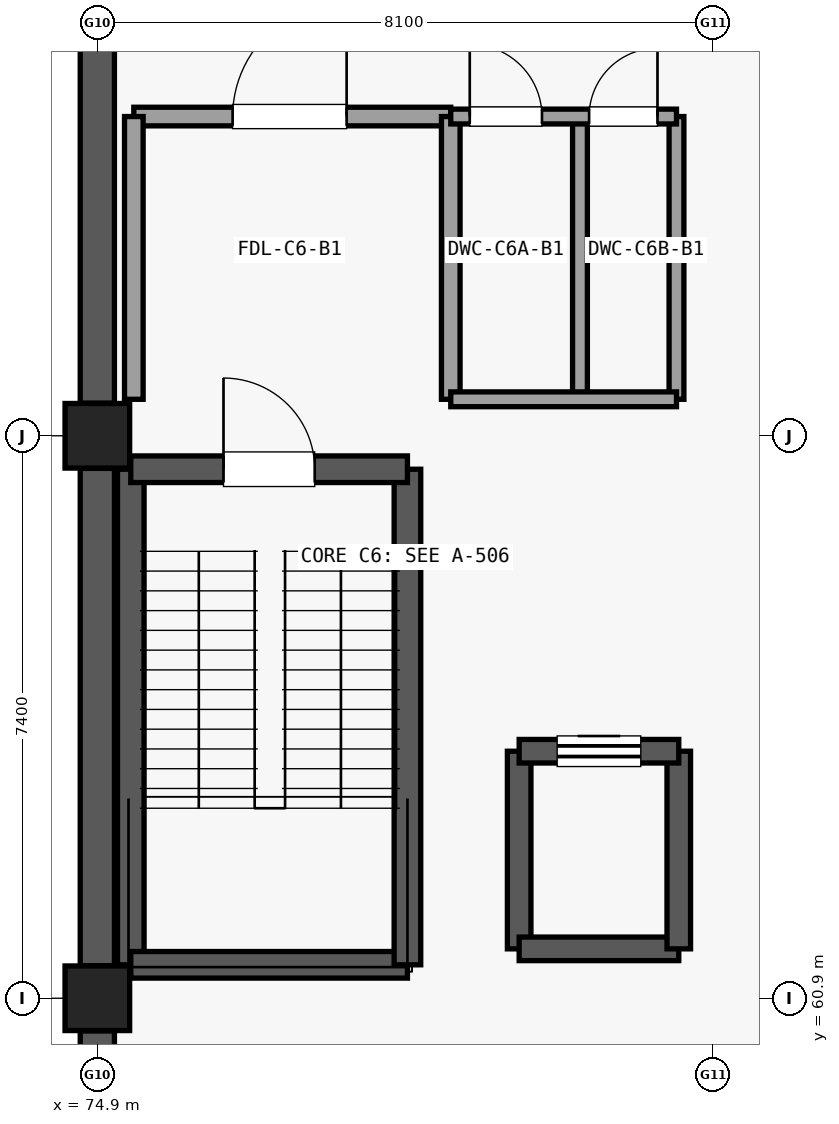
"""IFC4 building model, lengths in metres.
Left out: names, types, materials, properties, quantities, classifications, styles, units other than length and angle.
Written with IfcOpenShell. Run it as: python <this file> out.ifc"""

import sys

from ifc_helpers import new_model, si_unit, direction, frame, frame_2d, origin, origin_2d, place, context, subcontext, project, spatial, rectangle, extrude, element, fill, save


model = new_model("IFC4")
c1 = context("Model", 3, precision=1e-05, world=origin(), true_north=direction((0.0, 1.0)))
c2 = subcontext(c1, "Body", "Model", "MODEL_VIEW")
j1 = project(units=[si_unit("LENGTHUNIT", "METRE"), si_unit("PLANEANGLEUNIT", "RADIAN")], contexts=[c1])
p1 = place(None, origin())
s1 = spatial("IfcSite", under=j1, at=p1, CompositionType="ELEMENT")
p2 = place(p1, origin())
s2 = spatial("IfcBuilding", under=s1, at=p2, CompositionType="ELEMENT")
p3 = place(p2, frame((0.0, 0.0, -4.8)))
s3 = spatial("IfcBuildingStorey", under=s2, at=p3, CompositionType="ELEMENT", Elevation=-4.8)
for number, where, z_axis, x_axis in (
    (1, (74.9, 60.9, 0.0), (0.0, 0.0, 1.0), (1.0, 0.0, 0.0)),
    (2, (74.9, 68.3, 0.0), (0.0, 0.0, 1.0), (1.0, 0.0, 0.0)),
):
    element("IfcColumn", number, at=place(p3, frame(where, z_axis=z_axis, x_axis=x_axis)), inside=s3, PredefinedType="COLUMN", context=c2, shape_type="SweptSolid", body=[
        extrude(rectangle(XDim=0.85, YDim=0.85, at=origin_2d()), origin(), (0.0, 0.0, 1.0), 4.52),
    ])
for number, where, z_axis, x_axis in (
    (3, (74.9, 53.929, 0.0), (0.0, 0.0, 1.0), (0.0, 1.0, 0.0)),
    (4, (74.9, 61.329, 0.0), (0.0, 0.0, 1.0), (0.0, 1.0, 0.0)),
    (5, (74.9, 68.729, 0.0), (0.0, 0.0, 1.0), (0.0, 1.0, 0.0)),
):
    element("IfcWall", number, at=place(p3, frame(where, z_axis=z_axis, x_axis=x_axis)), inside=s3, PredefinedType="USERDEFINED", context=c2, shape_type="SweptSolid", body=[
        extrude(rectangle(XDim=6.542, YDim=0.45, at=frame_2d((3.271, 0.0))), origin(), (0.0, 0.0, 1.0), 2.95),
    ])
p4 = place(p3, frame((75.34, 61.34, 0.0), z_axis=(0.0, 0.0, 1.0), x_axis=(0.0, 1.0, 0.0)))
e6 = element("IfcWall", 6, at=p4, inside=s3, PredefinedType="SHEAR", context=c2, shape_type="SweptSolid", body=[
    extrude(rectangle(XDim=6.52, YDim=0.35, at=frame_2d((3.26, 0.0))), origin(), (0.0, 0.0, 1.0), 4.515),
])
p5 = place(p3, frame((75.34, 61.34, 0.0), z_axis=(0.0, 0.0, 1.0), x_axis=(1.0, 0.0, 0.0)))
e7 = element("IfcWall", 7, at=p5, inside=s3, PredefinedType="SHEAR", context=c2, shape_type="SweptSolid", body=[
    extrude(rectangle(XDim=3.64, YDim=0.35, at=frame_2d((1.82, 0.0))), origin(), (0.0, 0.0, 1.0), 4.515),
])
p6 = place(p3, frame((78.98, 61.34, 0.0), z_axis=(0.0, 0.0, 1.0), x_axis=(0.0, 1.0, 0.0)))
e8 = element("IfcWall", 8, at=p6, inside=s3, PredefinedType="SHEAR", context=c2, shape_type="SweptSolid", body=[
    extrude(rectangle(XDim=6.52, YDim=0.35, at=frame_2d((3.26, 0.0))), origin(), (0.0, 0.0, 1.0), 4.515),
])
p7 = place(p3, frame((75.34, 67.86, 0.0), z_axis=(0.0, 0.0, 1.0), x_axis=(1.0, 0.0, 0.0)))
e9 = element("IfcWall", 9, at=p7, inside=s3, PredefinedType="SHEAR", context=c2, shape_type="SweptSolid", body=[
    extrude(rectangle(XDim=3.64, YDim=0.35, at=frame_2d((1.82, 0.0))), origin(), (0.0, 0.0, 1.0), 4.515),
])
p8 = place(p7, frame((1.22, 0.0, 0.0)))
e10 = element("IfcOpeningElement", 10, at=p8, cuts=e9, PredefinedType="OPENING", context=c2, shape_type="SweptSolid", body=[
    extrude(rectangle(XDim=1.2, YDim=2.15, at=frame_2d((0.6, 1.075))), frame((0.0, 0.185, 0.0), z_axis=(0.0, -1.0, 0.0), x_axis=(1.0, 0.0, 0.0)), (0.0, 0.0, 1.0), 0.37),
])
p9 = place(p3, frame((80.45, 61.55, 0.0), z_axis=(0.0, 0.0, 1.0), x_axis=(0.0, 1.0, 0.0)))
e11 = element("IfcWall", 11, at=p9, inside=s3, PredefinedType="SHEAR", context=c2, shape_type="SweptSolid", body=[
    extrude(rectangle(XDim=2.6, YDim=0.31, at=frame_2d((1.3, 0.0))), origin(), (0.0, 0.0, 1.0), 4.515),
])
p10 = place(p3, frame((80.45, 61.55, 0.0), z_axis=(0.0, 0.0, 1.0), x_axis=(1.0, 0.0, 0.0)))
e12 = element("IfcWall", 12, at=p10, inside=s3, PredefinedType="SHEAR", context=c2, shape_type="SweptSolid", body=[
    extrude(rectangle(XDim=2.1, YDim=0.31, at=frame_2d((1.05, 0.0))), origin(), (0.0, 0.0, 1.0), 4.515),
])
p11 = place(p3, frame((82.55, 61.55, 0.0), z_axis=(0.0, 0.0, 1.0), x_axis=(0.0, 1.0, 0.0)))
e13 = element("IfcWall", 13, at=p11, inside=s3, PredefinedType="SHEAR", context=c2, shape_type="SweptSolid", body=[
    extrude(rectangle(XDim=2.6, YDim=0.31, at=frame_2d((1.3, 0.0))), origin(), (0.0, 0.0, 1.0), 4.515),
])
p12 = place(p3, frame((80.45, 64.15, 0.0), z_axis=(0.0, 0.0, 1.0), x_axis=(1.0, 0.0, 0.0)))
e14 = element("IfcWall", 14, at=p12, inside=s3, PredefinedType="SHEAR", context=c2, shape_type="SweptSolid", body=[
    extrude(rectangle(XDim=2.1, YDim=0.31, at=frame_2d((1.05, 0.0))), origin(), (0.0, 0.0, 1.0), 4.515),
])
p13 = place(p12, frame((0.5, 0.0, 0.0)))
e15 = element("IfcOpeningElement", 15, at=p13, cuts=e14, PredefinedType="OPENING", context=c2, shape_type="SweptSolid", body=[
    extrude(rectangle(XDim=1.1, YDim=2.15, at=frame_2d((0.55, 1.075))), frame((0.0, 0.165, 0.0), z_axis=(0.0, -1.0, 0.0), x_axis=(1.0, 0.0, 0.0)), (0.0, 0.0, 1.0), 0.33),
])
p14 = place(p3, frame((75.38, 72.5, 0.0), z_axis=(0.0, 0.0, 1.0), x_axis=(1.0, 0.0, 0.0)))
e16 = element("IfcWall", 16, at=p14, inside=s3, PredefinedType="PARTITIONING", context=c2, shape_type="SweptSolid", body=[
    extrude(rectangle(XDim=4.17, YDim=0.245, at=frame_2d((2.085, 0.0))), origin(), (0.0, 0.0, 1.0), 3.583),
])
p15 = place(p14, frame((1.3, 0.0, 0.0)))
e17 = element("IfcOpeningElement", 17, at=p15, cuts=e16, PredefinedType="OPENING", context=c2, shape_type="SweptSolid", body=[
    extrude(rectangle(XDim=1.5, YDim=2.15, at=frame_2d((0.75, 1.075))), frame((0.0, 0.133, 0.0), z_axis=(0.0, -1.0, 0.0), x_axis=(1.0, 0.0, 0.0)), (0.0, 0.0, 1.0), 0.265),
])
for number, where, z_axis, x_axis in (
    (18, (75.38, 68.78, 0.0), (0.0, 0.0, 1.0), (0.0, 1.0, 0.0)),
    (19, (79.55, 68.78, 0.0), (0.0, 0.0, 1.0), (0.0, 1.0, 0.0)),
):
    element("IfcWall", number, at=place(p3, frame(where, z_axis=z_axis, x_axis=x_axis)), inside=s3, PredefinedType="PARTITIONING", context=c2, shape_type="SweptSolid", body=[
        extrude(rectangle(XDim=3.72, YDim=0.245, at=frame_2d((1.86, 0.0))), origin(), (0.0, 0.0, 1.0), 3.583),
    ])
for number, where, z_axis, x_axis in (
    (20, (81.25, 68.78, 0.0), (0.0, 0.0, 1.0), (0.0, 1.0, 0.0)),
    (21, (82.52, 68.78, 0.0), (0.0, 0.0, 1.0), (0.0, 1.0, 0.0)),
):
    element("IfcWall", number, at=place(p3, frame(where, z_axis=z_axis, x_axis=x_axis)), inside=s3, PredefinedType="PARTITIONING", context=c2, shape_type="SweptSolid", body=[
        extrude(rectangle(XDim=3.72, YDim=0.195, at=frame_2d((1.86, 0.0))), origin(), (0.0, 0.0, 1.0), 3.583),
    ])
p16 = place(p3, frame((79.55, 68.78, 0.0), z_axis=(0.0, 0.0, 1.0), x_axis=(1.0, 0.0, 0.0)))
e22 = element("IfcWall", 22, at=p16, inside=s3, PredefinedType="PARTITIONING", context=c2, shape_type="SweptSolid", body=[
    extrude(rectangle(XDim=2.97, YDim=0.195, at=frame_2d((1.485, 0.0))), origin(), (0.0, 0.0, 1.0), 3.583),
])
p17 = place(p3, frame((79.55, 72.5, 0.0), z_axis=(0.0, 0.0, 1.0), x_axis=(1.0, 0.0, 0.0)))
e23 = element("IfcWall", 23, at=p17, inside=s3, PredefinedType="PARTITIONING", context=c2, shape_type="SweptSolid", body=[
    extrude(rectangle(XDim=2.97, YDim=0.195, at=frame_2d((1.485, 0.0))), origin(), (0.0, 0.0, 1.0), 3.583),
])
p18 = place(p17, frame((0.25, 0.0, 0.0)))
e24 = element("IfcOpeningElement", 24, at=p18, cuts=e23, PredefinedType="OPENING", context=c2, shape_type="SweptSolid", body=[
    extrude(rectangle(XDim=0.95, YDim=2.1, at=frame_2d((0.475, 1.05))), frame((0.0, 0.107, 0.0), z_axis=(0.0, -1.0, 0.0), x_axis=(1.0, 0.0, 0.0)), (0.0, 0.0, 1.0), 0.215),
])
p19 = place(p17, frame((1.82, 0.0, 0.0)))
e25 = element("IfcOpeningElement", 25, at=p19, cuts=e23, PredefinedType="OPENING", context=c2, shape_type="SweptSolid", body=[
    extrude(rectangle(XDim=0.9, YDim=2.1, at=frame_2d((0.45, 1.05))), frame((0.0, 0.107, 0.0), z_axis=(0.0, -1.0, 0.0), x_axis=(1.0, 0.0, 0.0)), (0.0, 0.0, 1.0), 0.215),
])
p20 = place(p8, origin())
e26 = element("IfcDoor", 26, at=p20, inside=s3, OperationType="SINGLE_SWING_LEFT", PredefinedType="DOOR", context=c2, shape_type="SweptSolid", body=[
    extrude(rectangle(XDim=1.2, YDim=2.15, at=frame_2d((0.6, 1.075))), frame((0.0, 0.025, 0.0), z_axis=(0.0, -1.0, 0.0), x_axis=(1.0, 0.0, 0.0)), (0.0, 0.0, 1.0), 0.05),
])
fill(e10, e26)
p21 = place(p13, origin())
e27 = element("IfcDoor", 27, at=p21, inside=s3, OperationType="SLIDING_TO_LEFT", PredefinedType="DOOR", context=c2, shape_type="SweptSolid", body=[
    extrude(rectangle(XDim=1.1, YDim=2.15, at=frame_2d((0.55, 1.075))), frame((0.0, 0.025, 0.0), z_axis=(0.0, -1.0, 0.0), x_axis=(1.0, 0.0, 0.0)), (0.0, 0.0, 1.0), 0.05),
])
fill(e15, e27)
p22 = place(p15, origin())
e28 = element("IfcDoor", 28, at=p22, inside=s3, OperationType="SINGLE_SWING_RIGHT", PredefinedType="DOOR", context=c2, shape_type="SweptSolid", body=[
    extrude(rectangle(XDim=1.5, YDim=2.15, at=frame_2d((0.75, 1.075))), frame((0.0, 0.025, 0.0), z_axis=(0.0, -1.0, 0.0), x_axis=(1.0, 0.0, 0.0)), (0.0, 0.0, 1.0), 0.05),
])
fill(e17, e28)
p23 = place(p18, origin())
e29 = element("IfcDoor", 29, at=p23, inside=s3, OperationType="SINGLE_SWING_LEFT", PredefinedType="DOOR", context=c2, shape_type="SweptSolid", body=[
    extrude(rectangle(XDim=0.95, YDim=2.1, at=frame_2d((0.475, 1.05))), frame((0.0, 0.025, 0.0), z_axis=(0.0, -1.0, 0.0), x_axis=(1.0, 0.0, 0.0)), (0.0, 0.0, 1.0), 0.05),
])
fill(e24, e29)
p24 = place(p19, origin())
e30 = element("IfcDoor", 30, at=p24, inside=s3, OperationType="SINGLE_SWING_RIGHT", PredefinedType="DOOR", context=c2, shape_type="SweptSolid", body=[
    extrude(rectangle(XDim=0.9, YDim=2.1, at=frame_2d((0.45, 1.05))), frame((0.0, 0.025, 0.0), z_axis=(0.0, -1.0, 0.0), x_axis=(1.0, 0.0, 0.0)), (0.0, 0.0, 1.0), 0.05),
])
fill(e25, e30)
save(model, sys.argv[1])
